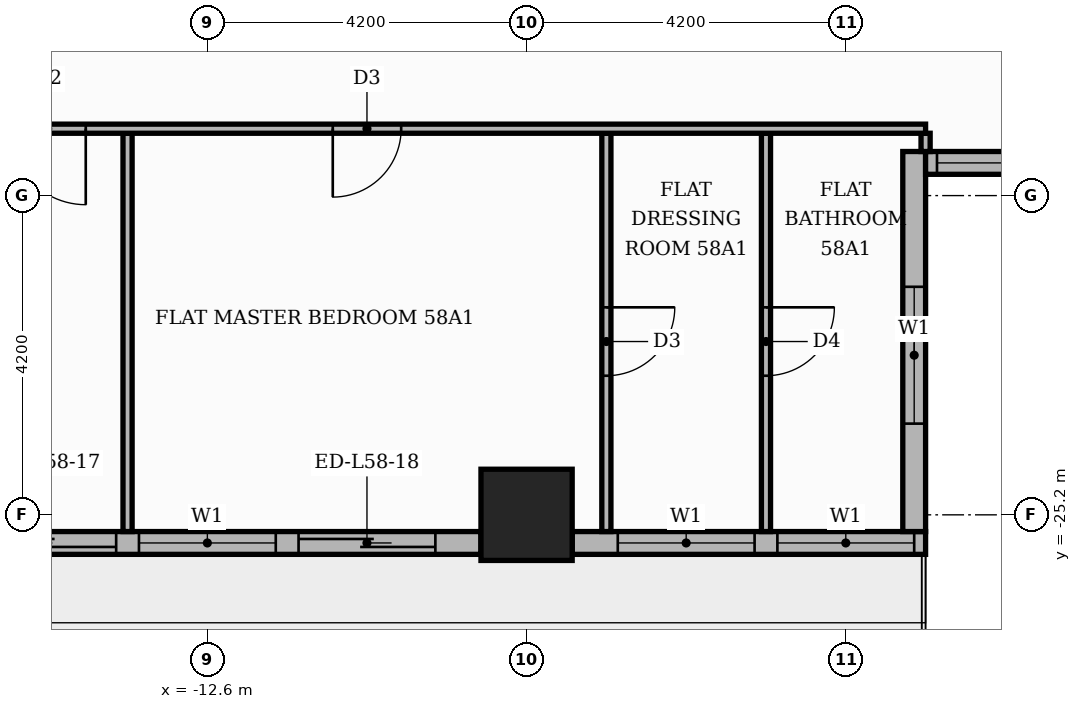
"""IFC4 building model, lengths in metres.
Left out: names, types, materials, properties, quantities, classifications, styles, units other than length and angle.
Written with IfcOpenShell. Run it as: python <this file> out.ifc"""

import sys

from ifc_helpers import new_model, si_unit, direction, frame, frame_2d, origin, origin_2d, place, context, subcontext, project, spatial, rectangle, extrude, element, fill, save


model = new_model("IFC4")
c1 = context("Model", 3, precision=1e-05, world=origin(), true_north=direction((0.0, 1.0)))
c2 = subcontext(c1, "Body", "Model", "MODEL_VIEW")
j1 = project(units=[si_unit("LENGTHUNIT", "METRE"), si_unit("PLANEANGLEUNIT", "RADIAN")], contexts=[c1])
p1 = place(None, origin())
s1 = spatial("IfcSite", under=j1, at=p1, CompositionType="ELEMENT")
p2 = place(p1, origin())
s2 = spatial("IfcBuilding", under=s1, at=p2, CompositionType="ELEMENT")
p3 = place(p2, frame((0.0, 0.0, 244.5)))
s3 = spatial("IfcBuildingStorey", under=s2, at=p3, CompositionType="ELEMENT", Elevation=244.5)
p4 = place(p3, frame((-8.4, -25.2, 0.0), z_axis=(0.0, 0.0, 1.0), x_axis=(1.0, 0.0, 0.0)))
e1 = element("IfcColumn", 1, at=p4, inside=s3, PredefinedType="COLUMN", context=c2, shape_type="SweptSolid", body=[
    extrude(rectangle(XDim=1.2, YDim=1.2, at=origin_2d()), origin(), (0.0, 0.0, 1.0), 3.9),
])
p5 = place(p3, frame((-16.2, -25.57, 0.0), z_axis=(0.0, 0.0, 1.0), x_axis=(1.0, 0.0, 0.0)))
e2 = element("IfcWall", 2, at=p5, inside=s3, PredefinedType="STANDARD", context=c2, shape_type="SweptSolid", body=[
    extrude(rectangle(XDim=7.2, YDim=0.3, at=frame_2d((3.6, 0.0))), origin(), (0.0, 0.0, 1.0), 3.48),
])
p6 = place(p5, frame((0.6, 0.0, 0.0)))
e3 = element("IfcOpeningElement", 3, at=p6, cuts=e2, PredefinedType="OPENING", context=c2, shape_type="SweptSolid", body=[
    extrude(rectangle(XDim=1.8, YDim=2.4, at=frame_2d((0.9, 1.2))), frame((0.0, 0.16, 0.0), z_axis=(0.0, -1.0, 0.0), x_axis=(1.0, 0.0, 0.0)), (0.0, 0.0, 1.0), 0.32),
])
p7 = place(p5, frame((2.7, 0.0, 0.9)))
e4 = element("IfcOpeningElement", 4, at=p7, cuts=e2, PredefinedType="OPENING", context=c2, shape_type="SweptSolid", body=[
    extrude(rectangle(XDim=1.8, YDim=2.1, at=frame_2d((0.9, 1.05))), frame((0.0, 0.16, 0.0), z_axis=(0.0, -1.0, 0.0), x_axis=(1.0, 0.0, 0.0)), (0.0, 0.0, 1.0), 0.32),
])
p8 = place(p5, frame((4.8, 0.0, 0.0)))
e5 = element("IfcOpeningElement", 5, at=p8, cuts=e2, PredefinedType="OPENING", context=c2, shape_type="SweptSolid", body=[
    extrude(rectangle(XDim=1.8, YDim=2.4, at=frame_2d((0.9, 1.2))), frame((0.0, 0.16, 0.0), z_axis=(0.0, -1.0, 0.0), x_axis=(1.0, 0.0, 0.0)), (0.0, 0.0, 1.0), 0.32),
])
p9 = place(p3, frame((-7.8, -25.57, 0.0), z_axis=(0.0, 0.0, 1.0), x_axis=(1.0, 0.0, 0.0)))
e6 = element("IfcWall", 6, at=p9, inside=s3, PredefinedType="STANDARD", context=c2, shape_type="SweptSolid", body=[
    extrude(rectangle(XDim=4.65, YDim=0.3, at=frame_2d((2.325, 0.0))), origin(), (0.0, 0.0, 1.0), 3.48),
])
p10 = place(p9, frame((0.6, 0.0, 0.9)))
e7 = element("IfcOpeningElement", 7, at=p10, cuts=e6, PredefinedType="OPENING", context=c2, shape_type="SweptSolid", body=[
    extrude(rectangle(XDim=1.8, YDim=2.1, at=frame_2d((0.9, 1.05))), frame((0.0, 0.16, 0.0), z_axis=(0.0, -1.0, 0.0), x_axis=(1.0, 0.0, 0.0)), (0.0, 0.0, 1.0), 0.32),
])
p11 = place(p9, frame((2.7, 0.0, 0.9)))
e8 = element("IfcOpeningElement", 8, at=p11, cuts=e6, PredefinedType="OPENING", context=c2, shape_type="SweptSolid", body=[
    extrude(rectangle(XDim=1.8, YDim=2.1, at=frame_2d((0.9, 1.05))), frame((0.0, 0.16, 0.0), z_axis=(0.0, -1.0, 0.0), x_axis=(1.0, 0.0, 0.0)), (0.0, 0.0, 1.0), 0.32),
])
p12 = place(p3, frame((-3.3, -25.42, 0.0), z_axis=(0.0, 0.0, 1.0), x_axis=(0.0, 1.0, 0.0)))
e9 = element("IfcWall", 9, at=p12, inside=s3, PredefinedType="STANDARD", context=c2, shape_type="SweptSolid", body=[
    extrude(rectangle(XDim=5.0, YDim=0.3, at=frame_2d((2.5, 0.0))), origin(), (0.0, 0.0, 1.0), 3.48),
])
p13 = place(p12, frame((1.42, 0.0, 0.9)))
e10 = element("IfcOpeningElement", 10, at=p13, cuts=e9, PredefinedType="OPENING", context=c2, shape_type="SweptSolid", body=[
    extrude(rectangle(XDim=1.8, YDim=2.1, at=frame_2d((0.9, 1.05))), frame((0.0, 0.16, 0.0), z_axis=(0.0, -1.0, 0.0), x_axis=(1.0, 0.0, 0.0)), (0.0, 0.0, 1.0), 0.32),
])
p14 = place(p3, frame((-3.15, -20.57, 0.0), z_axis=(0.0, 0.0, 1.0), x_axis=(1.0, 0.0, 0.0)))
e11 = element("IfcWall", 11, at=p14, inside=s3, PredefinedType="STANDARD", context=c2, shape_type="SweptSolid", body=[
    extrude(rectangle(XDim=6.6, YDim=0.3, at=frame_2d((3.3, 0.0))), origin(), (0.0, 0.0, 1.0), 3.48),
])
p15 = place(p14, frame((0.15, 0.0, 0.9)))
e12 = element("IfcOpeningElement", 12, at=p15, cuts=e11, PredefinedType="OPENING", context=c2, shape_type="SweptSolid", body=[
    extrude(rectangle(XDim=6.0, YDim=2.1, at=frame_2d((3.0, 1.05))), frame((0.0, 0.16, 0.0), z_axis=(0.0, -1.0, 0.0), x_axis=(1.0, 0.0, 0.0)), (0.0, 0.0, 1.0), 0.32),
])
p16 = place(p3, frame((-13.65, -25.42, 0.0), z_axis=(0.0, 0.0, 1.0), x_axis=(0.0, 1.0, 0.0)))
e13 = element("IfcWall", 13, at=p16, inside=s3, PredefinedType="PARTITIONING", context=c2, shape_type="SweptSolid", body=[
    extrude(rectangle(XDim=5.24, YDim=0.12, at=frame_2d((2.62, 0.0))), origin(), (0.0, 0.0, 1.0), 3.48),
])
p17 = place(p3, frame((-7.35, -25.42, 0.0), z_axis=(0.0, 0.0, 1.0), x_axis=(0.0, 1.0, 0.0)))
e14 = element("IfcWall", 14, at=p17, inside=s3, PredefinedType="PARTITIONING", context=c2, shape_type="SweptSolid", body=[
    extrude(rectangle(XDim=5.24, YDim=0.12, at=frame_2d((2.62, 0.0))), origin(), (0.0, 0.0, 1.0), 3.48),
])
p18 = place(p17, frame((2.05, 0.0, 0.0)))
e15 = element("IfcOpeningElement", 15, at=p18, cuts=e14, PredefinedType="OPENING", context=c2, shape_type="SweptSolid", body=[
    extrude(rectangle(XDim=0.9, YDim=2.1, at=frame_2d((0.45, 1.05))), frame((0.0, 0.07, 0.0), z_axis=(0.0, -1.0, 0.0), x_axis=(1.0, 0.0, 0.0)), (0.0, 0.0, 1.0), 0.14),
])
p19 = place(p3, frame((-5.25, -25.42, 0.0), z_axis=(0.0, 0.0, 1.0), x_axis=(0.0, 1.0, 0.0)))
e16 = element("IfcWall", 16, at=p19, inside=s3, PredefinedType="PARTITIONING", context=c2, shape_type="SweptSolid", body=[
    extrude(rectangle(XDim=5.24, YDim=0.12, at=frame_2d((2.62, 0.0))), origin(), (0.0, 0.0, 1.0), 3.48),
])
p20 = place(p19, frame((2.05, 0.0, 0.0)))
e17 = element("IfcOpeningElement", 17, at=p20, cuts=e16, PredefinedType="OPENING", context=c2, shape_type="SweptSolid", body=[
    extrude(rectangle(XDim=0.9, YDim=2.1, at=frame_2d((0.45, 1.05))), frame((0.0, 0.07, 0.0), z_axis=(0.0, -1.0, 0.0), x_axis=(1.0, 0.0, 0.0)), (0.0, 0.0, 1.0), 0.14),
])
p21 = place(p3, frame((-3.15, -20.42, 0.0), z_axis=(0.0, 0.0, 1.0), x_axis=(0.0, 1.0, 0.0)))
e18 = element("IfcWall", 18, at=p21, inside=s3, PredefinedType="PARTITIONING", context=c2, shape_type="SweptSolid", body=[
    extrude(rectangle(XDim=0.24, YDim=0.12, at=frame_2d((0.12, 0.0))), origin(), (0.0, 0.0, 1.0), 3.48),
])
p22 = place(p3, frame((-20.719, -20.12, 0.0), z_axis=(0.0, 0.0, 1.0), x_axis=(1.0, 0.0, 0.0)))
e19 = element("IfcWall", 19, at=p22, inside=s3, PredefinedType="PARTITIONING", context=c2, shape_type="SweptSolid", body=[
    extrude(rectangle(XDim=17.569, YDim=0.12, at=frame_2d((8.785, 0.0))), origin(), (0.0, 0.0, 1.0), 3.48),
])
p23 = place(p22, frame((5.519, 0.0, 0.0)))
e20 = element("IfcOpeningElement", 20, at=p23, cuts=e19, PredefinedType="OPENING", context=c2, shape_type="SweptSolid", body=[
    extrude(rectangle(XDim=1.0, YDim=2.1, at=frame_2d((0.5, 1.05))), frame((0.0, 0.07, 0.0), z_axis=(0.0, -1.0, 0.0), x_axis=(1.0, 0.0, 0.0)), (0.0, 0.0, 1.0), 0.14),
])
p24 = place(p22, frame((9.769, 0.0, 0.0)))
e21 = element("IfcOpeningElement", 21, at=p24, cuts=e19, PredefinedType="OPENING", context=c2, shape_type="SweptSolid", body=[
    extrude(rectangle(XDim=0.9, YDim=2.1, at=frame_2d((0.45, 1.05))), frame((0.0, 0.07, 0.0), z_axis=(0.0, -1.0, 0.0), x_axis=(1.0, 0.0, 0.0)), (0.0, 0.0, 1.0), 0.14),
])
p25 = place(p6, origin())
e22 = element("IfcDoor", 22, at=p25, inside=s3, OperationType="SLIDING_TO_LEFT", PredefinedType="DOOR", context=c2, shape_type="SweptSolid", body=[
    extrude(rectangle(XDim=1.8, YDim=2.4, at=frame_2d((0.9, 1.2))), frame((0.0, 0.025, 0.0), z_axis=(0.0, -1.0, 0.0), x_axis=(1.0, 0.0, 0.0)), (0.0, 0.0, 1.0), 0.05),
])
fill(e3, e22)
p26 = place(p7, origin())
e23 = element("IfcWindow", 23, at=p26, inside=s3, PartitioningType="SINGLE_PANEL", PredefinedType="WINDOW", context=c2, shape_type="SweptSolid", body=[
    extrude(rectangle(XDim=1.8, YDim=2.1, at=frame_2d((0.9, 1.05))), frame((0.0, 0.03, 0.0), z_axis=(0.0, -1.0, 0.0), x_axis=(1.0, 0.0, 0.0)), (0.0, 0.0, 1.0), 0.06),
])
fill(e4, e23)
p27 = place(p8, origin())
e24 = element("IfcDoor", 24, at=p27, inside=s3, OperationType="SLIDING_TO_RIGHT", PredefinedType="DOOR", context=c2, shape_type="SweptSolid", body=[
    extrude(rectangle(XDim=1.8, YDim=2.4, at=frame_2d((0.9, 1.2))), frame((0.0, 0.025, 0.0), z_axis=(0.0, -1.0, 0.0), x_axis=(1.0, 0.0, 0.0)), (0.0, 0.0, 1.0), 0.05),
])
fill(e5, e24)
p28 = place(p10, origin())
e25 = element("IfcWindow", 25, at=p28, inside=s3, PartitioningType="SINGLE_PANEL", PredefinedType="WINDOW", context=c2, shape_type="SweptSolid", body=[
    extrude(rectangle(XDim=1.8, YDim=2.1, at=frame_2d((0.9, 1.05))), frame((0.0, 0.03, 0.0), z_axis=(0.0, -1.0, 0.0), x_axis=(1.0, 0.0, 0.0)), (0.0, 0.0, 1.0), 0.06),
])
fill(e7, e25)
p29 = place(p11, origin())
e26 = element("IfcWindow", 26, at=p29, inside=s3, PartitioningType="SINGLE_PANEL", PredefinedType="WINDOW", context=c2, shape_type="SweptSolid", body=[
    extrude(rectangle(XDim=1.8, YDim=2.1, at=frame_2d((0.9, 1.05))), frame((0.0, 0.03, 0.0), z_axis=(0.0, -1.0, 0.0), x_axis=(1.0, 0.0, 0.0)), (0.0, 0.0, 1.0), 0.06),
])
fill(e8, e26)
p30 = place(p13, origin())
e27 = element("IfcWindow", 27, at=p30, inside=s3, PartitioningType="SINGLE_PANEL", PredefinedType="WINDOW", context=c2, shape_type="SweptSolid", body=[
    extrude(rectangle(XDim=1.8, YDim=2.1, at=frame_2d((0.9, 1.05))), frame((0.0, 0.03, 0.0), z_axis=(0.0, -1.0, 0.0), x_axis=(1.0, 0.0, 0.0)), (0.0, 0.0, 1.0), 0.06),
])
fill(e10, e27)
p31 = place(p15, origin())
e28 = element("IfcWindow", 28, at=p31, inside=s3, PartitioningType="SINGLE_PANEL", PredefinedType="WINDOW", context=c2, shape_type="SweptSolid", body=[
    extrude(rectangle(XDim=6.0, YDim=2.1, at=frame_2d((3.0, 1.05))), frame((0.0, 0.03, 0.0), z_axis=(0.0, -1.0, 0.0), x_axis=(1.0, 0.0, 0.0)), (0.0, 0.0, 1.0), 0.06),
])
fill(e12, e28)
p32 = place(p23, frame((1.0, 0.0, 0.0), z_axis=(0.0, 0.0, 1.0), x_axis=(-1.0, 0.0, 0.0)))
e29 = element("IfcDoor", 29, at=p32, inside=s3, OperationType="SINGLE_SWING_RIGHT", PredefinedType="DOOR", context=c2, shape_type="SweptSolid", body=[
    extrude(rectangle(XDim=1.0, YDim=2.1, at=frame_2d((0.5, 1.05))), frame((0.0, 0.025, 0.0), z_axis=(0.0, -1.0, 0.0), x_axis=(1.0, 0.0, 0.0)), (0.0, 0.0, 1.0), 0.05),
])
fill(e20, e29)
p33 = place(p24, frame((0.9, 0.0, 0.0), z_axis=(0.0, 0.0, 1.0), x_axis=(-1.0, 0.0, 0.0)))
e30 = element("IfcDoor", 30, at=p33, inside=s3, OperationType="SINGLE_SWING_LEFT", PredefinedType="DOOR", context=c2, shape_type="SweptSolid", body=[
    extrude(rectangle(XDim=0.9, YDim=2.1, at=frame_2d((0.45, 1.05))), frame((0.0, 0.025, 0.0), z_axis=(0.0, -1.0, 0.0), x_axis=(1.0, 0.0, 0.0)), (0.0, 0.0, 1.0), 0.05),
])
fill(e21, e30)
p34 = place(p18, frame((0.9, 0.0, 0.0), z_axis=(0.0, 0.0, 1.0), x_axis=(-1.0, 0.0, 0.0)))
e31 = element("IfcDoor", 31, at=p34, inside=s3, OperationType="SINGLE_SWING_RIGHT", PredefinedType="DOOR", context=c2, shape_type="SweptSolid", body=[
    extrude(rectangle(XDim=0.9, YDim=2.1, at=frame_2d((0.45, 1.05))), frame((0.0, 0.025, 0.0), z_axis=(0.0, -1.0, 0.0), x_axis=(1.0, 0.0, 0.0)), (0.0, 0.0, 1.0), 0.05),
])
fill(e15, e31)
p35 = place(p20, frame((0.9, 0.0, 0.0), z_axis=(0.0, 0.0, 1.0), x_axis=(-1.0, 0.0, 0.0)))
e32 = element("IfcDoor", 32, at=p35, inside=s3, OperationType="SINGLE_SWING_RIGHT", PredefinedType="DOOR", context=c2, shape_type="SweptSolid", body=[
    extrude(rectangle(XDim=0.9, YDim=2.1, at=frame_2d((0.45, 1.05))), frame((0.0, 0.025, 0.0), z_axis=(0.0, -1.0, 0.0), x_axis=(1.0, 0.0, 0.0)), (0.0, 0.0, 1.0), 0.05),
])
fill(e17, e32)
save(model, sys.argv[1])
